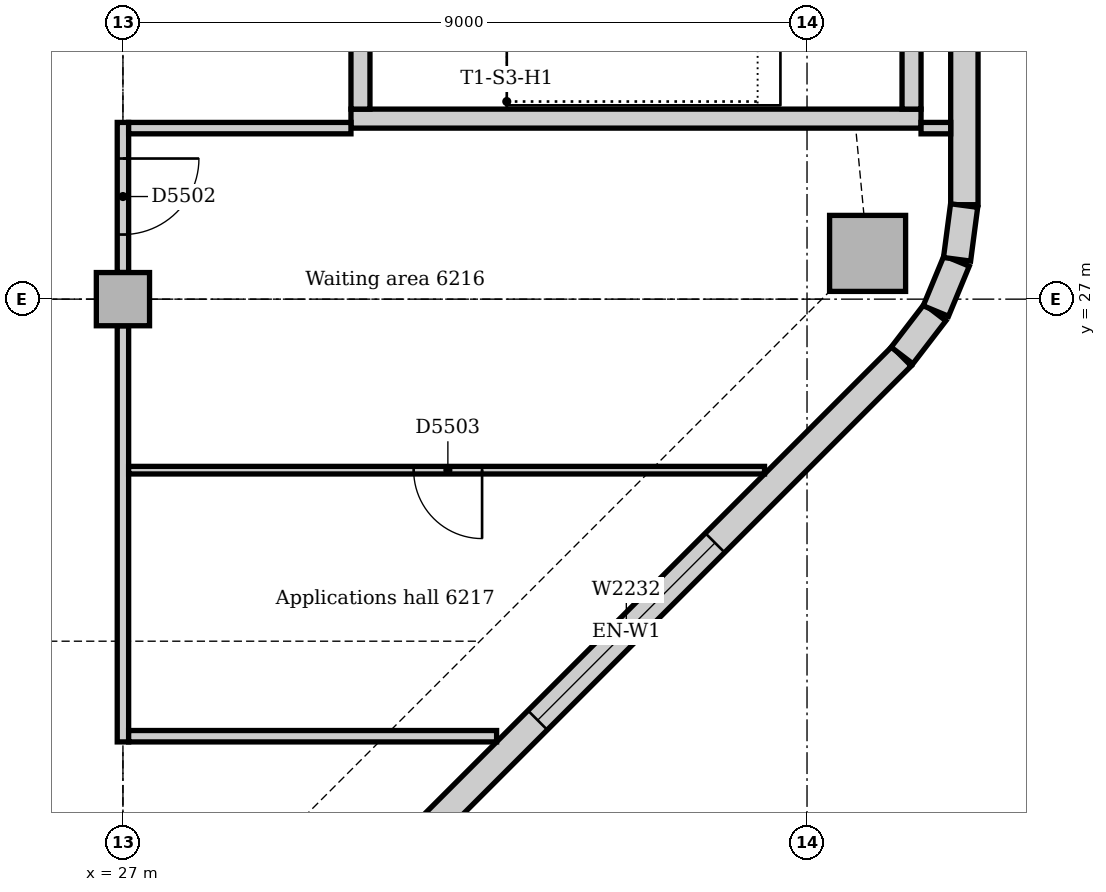
"""IFC4 building model, lengths in metres.
Left out: names, types, materials, properties, quantities, classifications, styles, units other than length and angle.
Written with IfcOpenShell. Run it as: python <this file> out.ifc"""

import sys

from ifc_helpers import new_model, si_unit, direction, frame, frame_2d, origin, origin_2d, place, context, subcontext, project, spatial, rectangle, extrude, element, fill, save


model = new_model("IFC4")
c1 = context("Model", 3, precision=1e-05, world=origin(), true_north=direction((0.0, 1.0)))
c2 = subcontext(c1, "Body", "Model", "MODEL_VIEW")
j1 = project(units=[si_unit("LENGTHUNIT", "METRE"), si_unit("PLANEANGLEUNIT", "RADIAN")], contexts=[c1])
p1 = place(None, origin())
s1 = spatial("IfcSite", under=j1, at=p1, CompositionType="ELEMENT")
p2 = place(p1, origin())
s2 = spatial("IfcBuilding", under=s1, at=p2, CompositionType="ELEMENT")
p3 = place(p2, frame((0.0, 0.0, 259.0)))
s3 = spatial("IfcBuildingStorey", under=s2, at=p3, CompositionType="ELEMENT", Elevation=259.0)
p4 = place(p3, frame((30.0, 29.375, 0.0), z_axis=(0.0, 0.0, 1.0), x_axis=(1.0, 0.0, 0.0)))
e1 = element("IfcWall", 1, at=p4, inside=s3, PredefinedType="SOLIDWALL", context=c2, shape_type="SweptSolid", body=[
    extrude(rectangle(XDim=7.5, YDim=0.25, at=frame_2d((3.75, 0.0))), origin(), (0.0, 0.0, 1.0), 4.0),
])
p5 = place(p3, frame((37.375, 29.5, 0.0), z_axis=(0.0, 0.0, 1.0), x_axis=(0.0, 1.0, 0.0)))
e2 = element("IfcWall", 2, at=p5, inside=s3, PredefinedType="SOLIDWALL", context=c2, shape_type="SweptSolid", body=[
    extrude(rectangle(XDim=4.0, YDim=0.25, at=frame_2d((2.0, 0.0))), origin(), (0.0, 0.0, 1.0), 4.0),
])
p6 = place(p3, frame((30.125, 33.5, 0.0), z_axis=(0.0, 0.0, 1.0), x_axis=(0.0, -1.0, 0.0)))
e3 = element("IfcWall", 3, at=p6, inside=s3, PredefinedType="SOLIDWALL", context=c2, shape_type="SweptSolid", body=[
    extrude(rectangle(XDim=4.0, YDim=0.25, at=frame_2d((2.0, 0.0))), origin(), (0.0, 0.0, 1.0), 4.0),
])
p7 = place(p6, frame((1.5, 0.0, 0.0)))
e4 = element("IfcOpeningElement", 4, at=p7, cuts=e3, PredefinedType="OPENING", context=c2, shape_type="SweptSolid", body=[
    extrude(rectangle(XDim=1.0, YDim=2.1, at=frame_2d((0.5, 1.05))), frame((0.0, 0.135, 0.0), z_axis=(0.0, -1.0, 0.0), x_axis=(1.0, 0.0, 0.0)), (0.0, 0.0, 1.0), 0.27),
])
p8 = place(p3, frame((36.797, 27.602, 0.0), z_axis=(0.0, 0.0, 1.0), x_axis=(1.0, 0.0, 0.0)))
e5 = element("IfcColumn", 5, at=p8, inside=s3, PredefinedType="COLUMN", context=c2, shape_type="SweptSolid", body=[
    extrude(rectangle(XDim=1.0, YDim=1.0, at=origin_2d()), origin(), (0.0, 0.0, 1.0), 3.85),
])
p9 = place(p3, frame((27.0, 27.0, 0.0), z_axis=(0.0, 0.0, 1.0), x_axis=(1.0, 0.0, 0.0)))
e6 = element("IfcColumn", 6, at=p9, inside=s3, PredefinedType="COLUMN", context=c2, shape_type="SweptSolid", body=[
    extrude(rectangle(XDim=0.7, YDim=0.7, at=origin_2d()), origin(), (0.0, 0.0, 1.0), 3.85),
])
p10 = place(p3, frame((30.001, 19.006, 0.0), z_axis=(0.0, 0.0, 1.0), x_axis=(0.707106781187, 0.707106781187, 0.0)))
e7 = element("IfcWall", 7, at=p10, inside=s3, PredefinedType="STANDARD", context=c2, shape_type="SweptSolid", body=[
    extrude(rectangle(XDim=10.243, YDim=0.36, at=frame_2d((5.121, 0.0))), origin(), (0.0, 0.0, 1.0), 3.85),
])
p11 = place(p10, frame((3.471, 0.0, 0.9)))
e8 = element("IfcOpeningElement", 8, at=p11, cuts=e7, PredefinedType="OPENING", context=c2, shape_type="SweptSolid", body=[
    extrude(rectangle(XDim=3.3, YDim=1.6, at=frame_2d((1.65, 0.8))), frame((0.0, 0.19, 0.0), z_axis=(0.0, -1.0, 0.0), x_axis=(1.0, 0.0, 0.0)), (0.0, 0.0, 1.0), 0.38),
])
p12 = place(p3, frame((38.07, 28.243, 0.0), z_axis=(0.0, 0.0, 1.0), x_axis=(0.0, 1.0, 0.0)))
e9 = element("IfcWall", 9, at=p12, inside=s3, PredefinedType="STANDARD", context=c2, shape_type="SweptSolid", body=[
    extrude(rectangle(XDim=24.515, YDim=0.36, at=frame_2d((12.257, 0.0))), origin(), (0.0, 0.0, 1.0), 3.85),
])
p13 = place(p12, frame((3.857, 0.0, 0.9)))
e10 = element("IfcOpeningElement", 10, at=p13, cuts=e9, PredefinedType="OPENING", context=c2, shape_type="SweptSolid", body=[
    extrude(rectangle(XDim=3.3, YDim=1.6, at=frame_2d((1.65, 0.8))), frame((0.0, 0.19, 0.0), z_axis=(0.0, -1.0, 0.0), x_axis=(1.0, 0.0, 0.0)), (0.0, 0.0, 1.0), 0.38),
])
p14 = place(p12, frame((8.657, 0.0, 0.9)))
e11 = element("IfcOpeningElement", 11, at=p14, cuts=e9, PredefinedType="OPENING", context=c2, shape_type="SweptSolid", body=[
    extrude(rectangle(XDim=3.3, YDim=1.6, at=frame_2d((1.65, 0.8))), frame((0.0, 0.19, 0.0), z_axis=(0.0, -1.0, 0.0), x_axis=(1.0, 0.0, 0.0)), (0.0, 0.0, 1.0), 0.38),
])
p15 = place(p12, frame((12.857, 0.0, 0.9)))
e12 = element("IfcOpeningElement", 12, at=p15, cuts=e9, PredefinedType="OPENING", context=c2, shape_type="SweptSolid", body=[
    extrude(rectangle(XDim=3.3, YDim=1.6, at=frame_2d((1.65, 0.8))), frame((0.0, 0.19, 0.0), z_axis=(0.0, -1.0, 0.0), x_axis=(1.0, 0.0, 0.0)), (0.0, 0.0, 1.0), 0.38),
])
p16 = place(p12, frame((17.357, 0.0, 0.9)))
e13 = element("IfcOpeningElement", 13, at=p16, cuts=e9, PredefinedType="OPENING", context=c2, shape_type="SweptSolid", body=[
    extrude(rectangle(XDim=3.3, YDim=1.6, at=frame_2d((1.65, 0.8))), frame((0.0, 0.19, 0.0), z_axis=(0.0, -1.0, 0.0), x_axis=(1.0, 0.0, 0.0)), (0.0, 0.0, 1.0), 0.38),
])
p17 = place(p3, frame((37.25, 26.259, 0.0), z_axis=(0.0, 0.0, 1.0), x_axis=(0.608802368033, 0.793321924995, 0.0)))
e14 = element("IfcWall", 14, at=p17, inside=s3, PredefinedType="STANDARD", context=c2, shape_type="SweptSolid", body=[
    extrude(rectangle(XDim=0.713, YDim=0.36, at=frame_2d((0.357, 0.0))), origin(), (0.0, 0.0, 1.0), 3.85),
])
for number, where, z_axis, x_axis in (
    (15, (37.695, 26.844, 0.0), (0.0, 0.0, 1.0), (0.383, 0.924, 0.0)),
    (16, (37.974, 27.524, 0.0), (0.0, 0.0, 1.0), (0.131, 0.991, 0.0)),
):
    element("IfcWall", number, at=place(p3, frame(where, z_axis=z_axis, x_axis=x_axis)), inside=s3, PredefinedType="STANDARD", context=c2, shape_type="SweptSolid", body=[
        extrude(rectangle(XDim=0.713, YDim=0.36, at=frame_2d((0.356, 0.0))), origin(), (0.0, 0.0, 1.0), 3.85),
    ])
p18 = place(p3, frame((27.0, 21.175, 0.0), z_axis=(0.0, 0.0, 1.0), x_axis=(0.0, 1.0, 0.0)))
e17 = element("IfcWall", 17, at=p18, inside=s3, PredefinedType="PARTITIONING", context=c2, shape_type="SweptSolid", body=[
    extrude(rectangle(XDim=5.475, YDim=0.15, at=frame_2d((2.737, 0.0))), origin(), (0.0, 0.0, 1.0), 3.4),
])
p19 = place(p3, frame((27.0, 27.35, 0.0), z_axis=(0.0, 0.0, 1.0), x_axis=(0.0, 1.0, 0.0)))
e18 = element("IfcWall", 18, at=p19, inside=s3, PredefinedType="PARTITIONING", context=c2, shape_type="SweptSolid", body=[
    extrude(rectangle(XDim=1.975, YDim=0.15, at=frame_2d((0.988, 0.0))), origin(), (0.0, 0.0, 1.0), 3.4),
])
p20 = place(p19, frame((0.5, 0.0, 0.0)))
e19 = element("IfcOpeningElement", 19, at=p20, cuts=e18, PredefinedType="OPENING", context=c2, shape_type="SweptSolid", body=[
    extrude(rectangle(XDim=1.0, YDim=2.1, at=frame_2d((0.5, 1.05))), frame((0.0, 0.085, 0.0), z_axis=(0.0, -1.0, 0.0), x_axis=(1.0, 0.0, 0.0)), (0.0, 0.0, 1.0), 0.17),
])
p21 = place(p3, frame((27.075, 21.25, 0.0), z_axis=(0.0, 0.0, 1.0), x_axis=(1.0, 0.0, 0.0)))
e20 = element("IfcWall", 20, at=p21, inside=s3, PredefinedType="PARTITIONING", context=c2, shape_type="SweptSolid", body=[
    extrude(rectangle(XDim=4.841, YDim=0.15, at=frame_2d((2.421, 0.0))), origin(), (0.0, 0.0, 1.0), 3.85),
])
p22 = place(p3, frame((27.075, 29.25, 0.0), z_axis=(0.0, 0.0, 1.0), x_axis=(1.0, 0.0, 0.0)))
e21 = element("IfcWall", 21, at=p22, inside=s3, PredefinedType="PARTITIONING", context=c2, shape_type="SweptSolid", body=[
    extrude(rectangle(XDim=2.925, YDim=0.15, at=frame_2d((1.462, 0.0))), origin(), (0.0, 0.0, 1.0), 3.85),
])
p23 = place(p3, frame((37.5, 29.25, 0.0), z_axis=(0.0, 0.0, 1.0), x_axis=(1.0, 0.0, 0.0)))
e22 = element("IfcWall", 22, at=p23, inside=s3, PredefinedType="PARTITIONING", context=c2, shape_type="SweptSolid", body=[
    extrude(rectangle(XDim=0.39, YDim=0.15, at=frame_2d((0.195, 0.0))), origin(), (0.0, 0.0, 1.0), 3.85),
])
p24 = place(p3, frame((27.075, 24.75, 0.0), z_axis=(0.0, 0.0, 1.0), x_axis=(1.0, 0.0, 0.0)))
e23 = element("IfcWall", 23, at=p24, inside=s3, PredefinedType="PARTITIONING", context=c2, shape_type="SweptSolid", body=[
    extrude(rectangle(XDim=8.366, YDim=0.1, at=frame_2d((4.183, 0.0))), origin(), (0.0, 0.0, 1.0), 3.85),
])
p25 = place(p24, frame((3.75, 0.0, 0.0)))
e24 = element("IfcOpeningElement", 24, at=p25, cuts=e23, PredefinedType="OPENING", context=c2, shape_type="SweptSolid", body=[
    extrude(rectangle(XDim=0.9, YDim=2.1, at=frame_2d((0.45, 1.05))), frame((0.0, 0.06, 0.0), z_axis=(0.0, -1.0, 0.0), x_axis=(1.0, 0.0, 0.0)), (0.0, 0.0, 1.0), 0.12),
])
p26 = place(p11, origin())
e25 = element("IfcWindow", 25, at=p26, inside=s3, PartitioningType="SINGLE_PANEL", PredefinedType="WINDOW", context=c2, shape_type="SweptSolid", body=[
    extrude(rectangle(XDim=3.3, YDim=1.6, at=frame_2d((1.65, 0.8))), frame((0.0, 0.13, 0.0), z_axis=(0.0, -1.0, 0.0), x_axis=(1.0, 0.0, 0.0)), (0.0, 0.0, 1.0), 0.06),
])
fill(e8, e25)
p27 = place(p20, frame((1.0, 0.0, 0.0), z_axis=(0.0, 0.0, 1.0), x_axis=(-1.0, 0.0, 0.0)))
e26 = element("IfcDoor", 26, at=p27, inside=s3, OperationType="SINGLE_SWING_LEFT", PredefinedType="DOOR", context=c2, shape_type="SweptSolid", body=[
    extrude(rectangle(XDim=1.0, YDim=2.1, at=frame_2d((0.5, 1.05))), frame((0.0, 0.025, 0.0), z_axis=(0.0, -1.0, 0.0), x_axis=(1.0, 0.0, 0.0)), (0.0, 0.0, 1.0), 0.05),
])
fill(e19, e26)
p28 = place(p25, frame((0.9, 0.0, 0.0), z_axis=(0.0, 0.0, 1.0), x_axis=(-1.0, 0.0, 0.0)))
e27 = element("IfcDoor", 27, at=p28, inside=s3, OperationType="SINGLE_SWING_LEFT", PredefinedType="DOOR", context=c2, shape_type="SweptSolid", body=[
    extrude(rectangle(XDim=0.9, YDim=2.1, at=frame_2d((0.45, 1.05))), frame((0.0, 0.025, 0.0), z_axis=(0.0, -1.0, 0.0), x_axis=(1.0, 0.0, 0.0)), (0.0, 0.0, 1.0), 0.05),
])
fill(e24, e27)
save(model, sys.argv[1])
